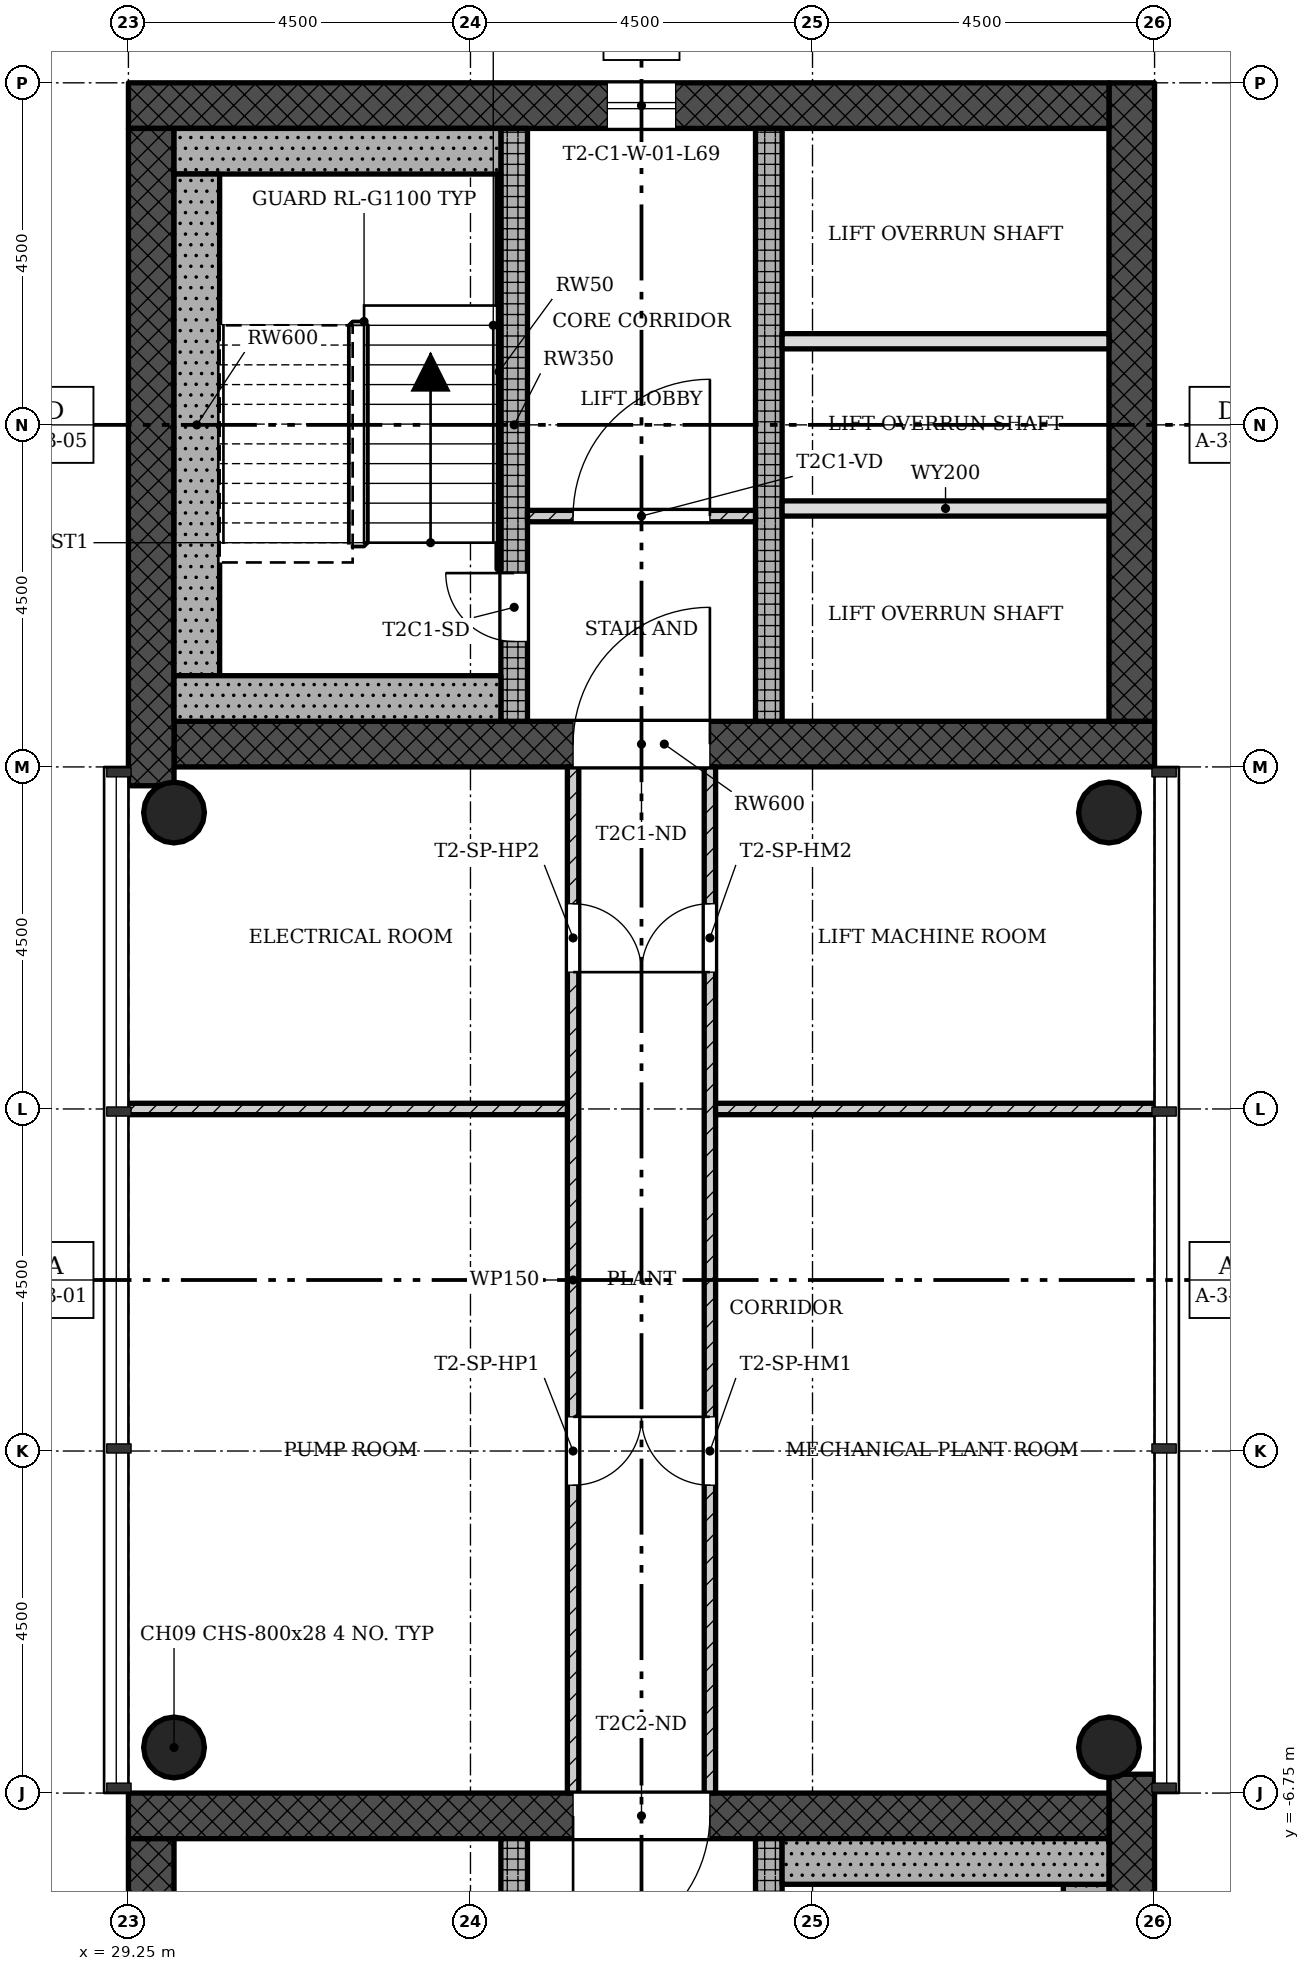
"""IFC4 building model, lengths in metres.
Left out: names, types, materials, properties, quantities, classifications, styles, units other than length and angle.
Written with IfcOpenShell. Run it as: python <this file> out.ifc"""

import sys

from ifc_helpers import new_model, si_unit, direction, frame, frame_2d, origin, origin_2d, place, context, subcontext, project, spatial, rectangle, hollow_circle, extrude, element, fill, save


model = new_model("IFC4")
c1 = context("Model", 3, precision=1e-05, world=origin(), true_north=direction((0.0, 1.0)))
c2 = subcontext(c1, "Body", "Model", "MODEL_VIEW")
j1 = project(units=[si_unit("LENGTHUNIT", "METRE"), si_unit("PLANEANGLEUNIT", "RADIAN")], contexts=[c1])
p1 = place(None, origin())
s1 = spatial("IfcSite", under=j1, at=p1, CompositionType="ELEMENT")
p2 = place(p1, origin())
s2 = spatial("IfcBuilding", under=s1, at=p2, CompositionType="ELEMENT")
p3 = place(p2, frame((0.0, 0.0, 251.4)))
s3 = spatial("IfcBuildingStorey", under=s2, at=p3, CompositionType="ELEMENT", Elevation=251.4)
p4 = place(p3, frame((29.85, 7.05, 0.0), z_axis=(0.0, 0.0, 1.0), x_axis=(1.0, 0.0, 0.0)))
e1 = element("IfcWall", 1, at=p4, inside=s3, PredefinedType="SHEAR", context=c2, shape_type="SweptSolid", body=[
    extrude(rectangle(XDim=12.9, YDim=0.6, at=frame_2d((6.45, 0.0))), origin(), (0.0, 0.0, 1.0), 4.5),
])
p5 = place(p4, frame((5.25, 0.0, 0.0)))
e2 = element("IfcOpeningElement", 2, at=p5, cuts=e1, PredefinedType="OPENING", context=c2, shape_type="SweptSolid", body=[
    extrude(rectangle(XDim=1.8, YDim=2.1, at=frame_2d((0.9, 1.05))), frame((0.0, 0.31, 0.0), z_axis=(0.0, -1.0, 0.0), x_axis=(1.0, 0.0, 0.0)), (0.0, 0.0, 1.0), 0.62),
])
p6 = place(p3, frame((42.45, 7.35, 0.0), z_axis=(0.0, 0.0, 1.0), x_axis=(0.0, 1.0, 0.0)))
e3 = element("IfcWall", 3, at=p6, inside=s3, PredefinedType="SHEAR", context=c2, shape_type="SweptSolid", body=[
    extrude(rectangle(XDim=8.4, YDim=0.6, at=frame_2d((4.2, 0.0))), origin(), (0.0, 0.0, 1.0), 4.5),
])
p7 = place(p3, frame((42.15, 15.45, 0.0), z_axis=(0.0, 0.0, 1.0), x_axis=(-1.0, 0.0, 0.0)))
e4 = element("IfcWall", 4, at=p7, inside=s3, PredefinedType="SHEAR", context=c2, shape_type="SweptSolid", body=[
    extrude(rectangle(XDim=12.9, YDim=0.6, at=frame_2d((6.45, 0.0))), origin(), (0.0, 0.0, 1.0), 4.5),
])
p8 = place(p7, frame((5.7, 0.0, 0.45)))
e5 = element("IfcOpeningElement", 5, at=p8, cuts=e4, PredefinedType="OPENING", context=c2, shape_type="SweptSolid", body=[
    extrude(rectangle(XDim=0.9, YDim=2.4, at=frame_2d((0.45, 1.2))), frame((0.0, 0.31, 0.0), z_axis=(0.0, -1.0, 0.0), x_axis=(1.0, 0.0, 0.0)), (0.0, 0.0, 1.0), 0.62),
])
p9 = place(p3, frame((29.55, 15.15, 0.0), z_axis=(0.0, 0.0, 1.0), x_axis=(0.0, -1.0, 0.0)))
e6 = element("IfcWall", 6, at=p9, inside=s3, PredefinedType="SHEAR", context=c2, shape_type="SweptSolid", body=[
    extrude(rectangle(XDim=8.648, YDim=0.6, at=frame_2d((4.324, 0.0))), origin(), (0.0, 0.0, 1.0), 4.5),
])
p10 = place(p3, frame((34.325, 7.35, 0.0), z_axis=(0.0, 0.0, 1.0), x_axis=(0.0, 1.0, 0.0)))
e7 = element("IfcWall", 7, at=p10, inside=s3, PredefinedType="SHEAR", context=c2, shape_type="SweptSolid", body=[
    extrude(rectangle(XDim=7.8, YDim=0.35, at=frame_2d((3.9, 0.0))), origin(), (0.0, 0.0, 1.0), 4.5),
])
p11 = place(p10, frame((1.05, 0.0, 0.0)))
e8 = element("IfcOpeningElement", 8, at=p11, cuts=e7, PredefinedType="OPENING", context=c2, shape_type="SweptSolid", body=[
    extrude(rectangle(XDim=0.9, YDim=2.1, at=frame_2d((0.45, 1.05))), frame((0.0, 0.185, 0.0), z_axis=(0.0, -1.0, 0.0), x_axis=(1.0, 0.0, 0.0)), (0.0, 0.0, 1.0), 0.37),
])
p12 = place(p3, frame((37.675, 7.35, 0.0), z_axis=(0.0, 0.0, 1.0), x_axis=(0.0, 1.0, 0.0)))
e9 = element("IfcWall", 9, at=p12, inside=s3, PredefinedType="SHEAR", context=c2, shape_type="SweptSolid", body=[
    extrude(rectangle(XDim=7.8, YDim=0.35, at=frame_2d((3.9, 0.0))), origin(), (0.0, 0.0, 1.0), 4.5),
])
p13 = place(p3, frame((42.45, -15.15, 0.0), z_axis=(0.0, 0.0, 1.0), x_axis=(0.0, 1.0, 0.0)))
e10 = element("IfcWall", 10, at=p13, inside=s3, PredefinedType="SHEAR", context=c2, shape_type="SweptSolid", body=[
    extrude(rectangle(XDim=8.648, YDim=0.6, at=frame_2d((4.324, 0.0))), origin(), (0.0, 0.0, 1.0), 4.5),
])
p14 = place(p3, frame((42.15, -7.05, 0.0), z_axis=(0.0, 0.0, 1.0), x_axis=(-1.0, 0.0, 0.0)))
e11 = element("IfcWall", 11, at=p14, inside=s3, PredefinedType="SHEAR", context=c2, shape_type="SweptSolid", body=[
    extrude(rectangle(XDim=12.9, YDim=0.6, at=frame_2d((6.45, 0.0))), origin(), (0.0, 0.0, 1.0), 4.5),
])
p15 = place(p14, frame((5.25, 0.0, 0.0)))
e12 = element("IfcOpeningElement", 12, at=p15, cuts=e11, PredefinedType="OPENING", context=c2, shape_type="SweptSolid", body=[
    extrude(rectangle(XDim=1.8, YDim=2.1, at=frame_2d((0.9, 1.05))), frame((0.0, 0.31, 0.0), z_axis=(0.0, -1.0, 0.0), x_axis=(1.0, 0.0, 0.0)), (0.0, 0.0, 1.0), 0.62),
])
p16 = place(p3, frame((29.55, -7.35, 0.0), z_axis=(0.0, 0.0, 1.0), x_axis=(0.0, -1.0, 0.0)))
e13 = element("IfcWall", 13, at=p16, inside=s3, PredefinedType="SHEAR", context=c2, shape_type="SweptSolid", body=[
    extrude(rectangle(XDim=8.4, YDim=0.6, at=frame_2d((4.2, 0.0))), origin(), (0.0, 0.0, 1.0), 4.5),
])
p17 = place(p3, frame((34.325, -15.15, 0.0), z_axis=(0.0, 0.0, 1.0), x_axis=(0.0, 1.0, 0.0)))
e14 = element("IfcWall", 14, at=p17, inside=s3, PredefinedType="SHEAR", context=c2, shape_type="SweptSolid", body=[
    extrude(rectangle(XDim=7.8, YDim=0.35, at=frame_2d((3.9, 0.0))), origin(), (0.0, 0.0, 1.0), 4.5),
])
p18 = place(p17, frame((5.55, 0.0, 0.0)))
e15 = element("IfcOpeningElement", 15, at=p18, cuts=e14, PredefinedType="OPENING", context=c2, shape_type="SweptSolid", body=[
    extrude(rectangle(XDim=1.1, YDim=2.1, at=frame_2d((0.55, 1.05))), frame((0.0, 0.185, 0.0), z_axis=(0.0, -1.0, 0.0), x_axis=(1.0, 0.0, 0.0)), (0.0, 0.0, 1.0), 0.37),
])
p19 = place(p17, frame((3.5, 0.0, 0.0)))
e16 = element("IfcOpeningElement", 16, at=p19, cuts=e14, PredefinedType="OPENING", context=c2, shape_type="SweptSolid", body=[
    extrude(rectangle(XDim=0.9, YDim=2.1, at=frame_2d((0.45, 1.05))), frame((0.0, 0.185, 0.0), z_axis=(0.0, -1.0, 0.0), x_axis=(1.0, 0.0, 0.0)), (0.0, 0.0, 1.0), 0.37),
])
p20 = place(p3, frame((37.675, -15.15, 0.0), z_axis=(0.0, 0.0, 1.0), x_axis=(0.0, 1.0, 0.0)))
e17 = element("IfcWall", 17, at=p20, inside=s3, PredefinedType="SHEAR", context=c2, shape_type="SweptSolid", body=[
    extrude(rectangle(XDim=7.8, YDim=0.35, at=frame_2d((3.9, 0.0))), origin(), (0.0, 0.0, 1.0), 4.5),
])
p21 = place(p20, frame((5.85, 0.0, 0.0)))
e18 = element("IfcOpeningElement", 18, at=p21, cuts=e17, PredefinedType="OPENING", context=c2, shape_type="SweptSolid", body=[
    extrude(rectangle(XDim=0.9, YDim=2.1, at=frame_2d((0.45, 1.05))), frame((0.0, 0.185, 0.0), z_axis=(0.0, -1.0, 0.0), x_axis=(1.0, 0.0, 0.0)), (0.0, 0.0, 1.0), 0.37),
])
for number, where, z_axis, x_axis in (
    (19, (42.15, -6.15, 0.0), (0.0, 0.0, 1.0), (1.0, 0.0, 0.0)),
    (20, (42.15, 6.15, 0.0), (0.0, 0.0, 1.0), (1.0, 0.0, 0.0)),
    (21, (29.85, 6.15, 0.0), (0.0, 0.0, 1.0), (1.0, 0.0, 0.0)),
    (22, (29.85, -6.15, 0.0), (0.0, 0.0, 1.0), (1.0, 0.0, 0.0)),
):
    element("IfcColumn", number, at=place(p3, frame(where, z_axis=z_axis, x_axis=x_axis)), inside=s3, PredefinedType="COLUMN", context=c2, shape_type="SweptSolid", body=[
        extrude(hollow_circle(Radius=0.4, WallThickness=0.028, at=origin_2d()), origin(), (0.0, 0.0, 1.0), 4.5),
    ])
p22 = place(p3, frame((37.5, 10.05, 0.0), z_axis=(0.0, 0.0, 1.0), x_axis=(-1.0, 0.0, 0.0)))
e23 = element("IfcWall", 23, at=p22, inside=s3, PredefinedType="PARTITIONING", context=c2, shape_type="SweptSolid", body=[
    extrude(rectangle(XDim=3.0, YDim=0.15, at=frame_2d((1.5, 0.0))), origin(), (0.0, 0.0, 1.0), 4.1),
])
p23 = place(p22, frame((0.6, 0.0, 0.0)))
e24 = element("IfcOpeningElement", 24, at=p23, cuts=e23, PredefinedType="OPENING", context=c2, shape_type="SweptSolid", body=[
    extrude(rectangle(XDim=1.8, YDim=2.1, at=frame_2d((0.9, 1.05))), frame((0.0, 0.085, 0.0), z_axis=(0.0, -1.0, 0.0), x_axis=(1.0, 0.0, 0.0)), (0.0, 0.0, 1.0), 0.17),
])
for number, where, z_axis, x_axis in (
    (25, (42.15, 10.15, 0.0), (0.0, 0.0, 1.0), (-1.0, 0.0, 0.0)),
    (26, (42.15, 12.35, 0.0), (0.0, 0.0, 1.0), (-1.0, 0.0, 0.0)),
):
    element("IfcWall", number, at=place(p3, frame(where, z_axis=z_axis, x_axis=x_axis)), inside=s3, PredefinedType="SOLIDWALL", context=c2, shape_type="SweptSolid", body=[
        extrude(rectangle(XDim=4.3, YDim=0.2, at=frame_2d((2.15, 0.0))), origin(), (0.0, 0.0, 1.0), 4.1),
    ])
p24 = place(p3, frame((35.1, -6.75, 0.0), z_axis=(0.0, 0.0, 1.0), x_axis=(0.0, 1.0, 0.0)))
e27 = element("IfcWall", 27, at=p24, inside=s3, PredefinedType="PARTITIONING", context=c2, shape_type="SweptSolid", body=[
    extrude(rectangle(XDim=13.5, YDim=0.15, at=frame_2d((6.75, 0.0))), origin(), (0.0, 0.0, 1.0), 4.1),
])
p25 = place(p24, frame((4.05, 0.0, 0.0)))
e28 = element("IfcOpeningElement", 28, at=p25, cuts=e27, PredefinedType="OPENING", context=c2, shape_type="SweptSolid", body=[
    extrude(rectangle(XDim=0.9, YDim=2.1, at=frame_2d((0.45, 1.05))), frame((0.0, 0.085, 0.0), z_axis=(0.0, -1.0, 0.0), x_axis=(1.0, 0.0, 0.0)), (0.0, 0.0, 1.0), 0.17),
])
p26 = place(p24, frame((10.8, 0.0, 0.0)))
e29 = element("IfcOpeningElement", 29, at=p26, cuts=e27, PredefinedType="OPENING", context=c2, shape_type="SweptSolid", body=[
    extrude(rectangle(XDim=0.9, YDim=2.1, at=frame_2d((0.45, 1.05))), frame((0.0, 0.085, 0.0), z_axis=(0.0, -1.0, 0.0), x_axis=(1.0, 0.0, 0.0)), (0.0, 0.0, 1.0), 0.17),
])
p27 = place(p3, frame((35.025, 2.25, 0.0), z_axis=(0.0, 0.0, 1.0), x_axis=(-1.0, 0.0, 0.0)))
e30 = element("IfcWall", 30, at=p27, inside=s3, PredefinedType="PARTITIONING", context=c2, shape_type="SweptSolid", body=[
    extrude(rectangle(XDim=5.875, YDim=0.15, at=frame_2d((2.938, 0.0))), origin(), (0.0, 0.0, 1.0), 4.1),
])
p28 = place(p3, frame((36.9, -6.75, 0.0), z_axis=(0.0, 0.0, 1.0), x_axis=(0.0, 1.0, 0.0)))
e31 = element("IfcWall", 31, at=p28, inside=s3, PredefinedType="PARTITIONING", context=c2, shape_type="SweptSolid", body=[
    extrude(rectangle(XDim=13.5, YDim=0.15, at=frame_2d((6.75, 0.0))), origin(), (0.0, 0.0, 1.0), 4.1),
])
p29 = place(p28, frame((4.05, 0.0, 0.0)))
e32 = element("IfcOpeningElement", 32, at=p29, cuts=e31, PredefinedType="OPENING", context=c2, shape_type="SweptSolid", body=[
    extrude(rectangle(XDim=0.9, YDim=2.1, at=frame_2d((0.45, 1.05))), frame((0.0, 0.085, 0.0), z_axis=(0.0, -1.0, 0.0), x_axis=(1.0, 0.0, 0.0)), (0.0, 0.0, 1.0), 0.17),
])
p30 = place(p28, frame((10.8, 0.0, 0.0)))
e33 = element("IfcOpeningElement", 33, at=p30, cuts=e31, PredefinedType="OPENING", context=c2, shape_type="SweptSolid", body=[
    extrude(rectangle(XDim=0.9, YDim=2.1, at=frame_2d((0.45, 1.05))), frame((0.0, 0.085, 0.0), z_axis=(0.0, -1.0, 0.0), x_axis=(1.0, 0.0, 0.0)), (0.0, 0.0, 1.0), 0.17),
])
p31 = place(p3, frame((36.975, 2.25, 0.0), z_axis=(0.0, 0.0, 1.0), x_axis=(1.0, 0.0, 0.0)))
e34 = element("IfcWall", 34, at=p31, inside=s3, PredefinedType="PARTITIONING", context=c2, shape_type="SweptSolid", body=[
    extrude(rectangle(XDim=5.875, YDim=0.15, at=frame_2d((2.938, 0.0))), origin(), (0.0, 0.0, 1.0), 4.1),
])
p32 = place(p3, frame((34.15, 14.85, 0.0), z_axis=(0.0, 0.0, 1.0), x_axis=(-1.0, 0.0, 0.0)))
e35 = element("IfcWall", 35, at=p32, inside=s3, PredefinedType="SHEAR", context=c2, shape_type="SweptSolid", body=[
    extrude(rectangle(XDim=4.3, YDim=0.6, at=frame_2d((2.15, 0.0))), origin(), (0.0, 0.0, 1.0), 4.5),
])
p33 = place(p3, frame((30.15, 7.95, 0.0), z_axis=(0.0, 0.0, 1.0), x_axis=(0.0, 1.0, 0.0)))
e36 = element("IfcWall", 36, at=p33, inside=s3, PredefinedType="SHEAR", context=c2, shape_type="SweptSolid", body=[
    extrude(rectangle(XDim=6.6, YDim=0.6, at=frame_2d((3.3, 0.0))), origin(), (0.0, 0.0, 1.0), 4.5),
])
p34 = place(p3, frame((34.15, 7.65, 0.0), z_axis=(0.0, 0.0, 1.0), x_axis=(-1.0, 0.0, 0.0)))
e37 = element("IfcWall", 37, at=p34, inside=s3, PredefinedType="SHEAR", context=c2, shape_type="SweptSolid", body=[
    extrude(rectangle(XDim=4.3, YDim=0.6, at=frame_2d((2.15, 0.0))), origin(), (0.0, 0.0, 1.0), 4.5),
])
p35 = place(p3, frame((34.125, 9.35, 0.0), z_axis=(0.0, 0.0, 1.0), x_axis=(0.0, 1.0, 0.0)))
e38 = element("IfcWall", 38, at=p35, inside=s3, PredefinedType="SHEAR", context=c2, shape_type="SweptSolid", body=[
    extrude(rectangle(XDim=5.2, YDim=0.05, at=frame_2d((2.6, 0.0))), origin(), (0.0, 0.0, 1.0), 4.5),
])
p36 = place(p3, frame((41.85, -7.95, 0.0), z_axis=(0.0, 0.0, 1.0), x_axis=(0.0, -1.0, 0.0)))
e39 = element("IfcWall", 39, at=p36, inside=s3, PredefinedType="SHEAR", context=c2, shape_type="SweptSolid", body=[
    extrude(rectangle(XDim=6.6, YDim=0.6, at=frame_2d((3.3, 0.0))), origin(), (0.0, 0.0, 1.0), 4.5),
])
p37 = place(p3, frame((37.85, -7.65, 0.0), z_axis=(0.0, 0.0, 1.0), x_axis=(1.0, 0.0, 0.0)))
e40 = element("IfcWall", 40, at=p37, inside=s3, PredefinedType="SHEAR", context=c2, shape_type="SweptSolid", body=[
    extrude(rectangle(XDim=4.3, YDim=0.6, at=frame_2d((2.15, 0.0))), origin(), (0.0, 0.0, 1.0), 4.5),
])
p38 = place(p8, origin())
e41 = element("IfcWindow", 41, at=p38, inside=s3, PartitioningType="SINGLE_PANEL", PredefinedType="WINDOW", context=c2, shape_type="SweptSolid", body=[
    extrude(rectangle(XDim=0.9, YDim=2.4, at=frame_2d((0.45, 1.2))), frame((0.0, 0.03, 0.0), z_axis=(0.0, -1.0, 0.0), x_axis=(1.0, 0.0, 0.0)), (0.0, 0.0, 1.0), 0.06),
])
fill(e5, e41)
p39 = place(p23, origin())
e42 = element("IfcDoor", 42, at=p39, inside=s3, OperationType="SINGLE_SWING_LEFT", PredefinedType="DOOR", context=c2, shape_type="SweptSolid", body=[
    extrude(rectangle(XDim=1.8, YDim=2.1, at=frame_2d((0.9, 1.05))), frame((0.0, 0.025, 0.0), z_axis=(0.0, -1.0, 0.0), x_axis=(1.0, 0.0, 0.0)), (0.0, 0.0, 1.0), 0.05),
])
fill(e24, e42)
p40 = place(p25, origin())
e43 = element("IfcDoor", 43, at=p40, inside=s3, OperationType="SINGLE_SWING_RIGHT", PredefinedType="DOOR", context=c2, shape_type="SweptSolid", body=[
    extrude(rectangle(XDim=0.9, YDim=2.1, at=frame_2d((0.45, 1.05))), frame((0.0, 0.025, 0.0), z_axis=(0.0, -1.0, 0.0), x_axis=(1.0, 0.0, 0.0)), (0.0, 0.0, 1.0), 0.05),
])
fill(e28, e43)
p41 = place(p26, origin())
e44 = element("IfcDoor", 44, at=p41, inside=s3, OperationType="SINGLE_SWING_LEFT", PredefinedType="DOOR", context=c2, shape_type="SweptSolid", body=[
    extrude(rectangle(XDim=0.9, YDim=2.1, at=frame_2d((0.45, 1.05))), frame((0.0, 0.025, 0.0), z_axis=(0.0, -1.0, 0.0), x_axis=(1.0, 0.0, 0.0)), (0.0, 0.0, 1.0), 0.05),
])
fill(e29, e44)
p42 = place(p29, origin())
e45 = element("IfcDoor", 45, at=p42, inside=s3, OperationType="SINGLE_SWING_LEFT", PredefinedType="DOOR", context=c2, shape_type="SweptSolid", body=[
    extrude(rectangle(XDim=0.9, YDim=2.1, at=frame_2d((0.45, 1.05))), frame((0.0, 0.025, 0.0), z_axis=(0.0, -1.0, 0.0), x_axis=(1.0, 0.0, 0.0)), (0.0, 0.0, 1.0), 0.05),
])
fill(e32, e45)
p43 = place(p30, origin())
e46 = element("IfcDoor", 46, at=p43, inside=s3, OperationType="SINGLE_SWING_RIGHT", PredefinedType="DOOR", context=c2, shape_type="SweptSolid", body=[
    extrude(rectangle(XDim=0.9, YDim=2.1, at=frame_2d((0.45, 1.05))), frame((0.0, 0.025, 0.0), z_axis=(0.0, -1.0, 0.0), x_axis=(1.0, 0.0, 0.0)), (0.0, 0.0, 1.0), 0.05),
])
fill(e33, e46)
p44 = place(p11, origin())
e47 = element("IfcDoor", 47, at=p44, inside=s3, OperationType="SINGLE_SWING_LEFT", PredefinedType="DOOR", context=c2, shape_type="SweptSolid", body=[
    extrude(rectangle(XDim=0.9, YDim=2.1, at=frame_2d((0.45, 1.05))), frame((0.0, 0.025, 0.0), z_axis=(0.0, -1.0, 0.0), x_axis=(1.0, 0.0, 0.0)), (0.0, 0.0, 1.0), 0.05),
])
fill(e8, e47)
p45 = place(p5, origin())
e48 = element("IfcDoor", 48, at=p45, inside=s3, OperationType="SINGLE_SWING_LEFT", PredefinedType="DOOR", context=c2, shape_type="SweptSolid", body=[
    extrude(rectangle(XDim=1.8, YDim=2.1, at=frame_2d((0.9, 1.05))), frame((0.0, 0.025, 0.0), z_axis=(0.0, -1.0, 0.0), x_axis=(1.0, 0.0, 0.0)), (0.0, 0.0, 1.0), 0.05),
])
fill(e2, e48)
p46 = place(p15, origin())
e49 = element("IfcDoor", 49, at=p46, inside=s3, OperationType="SINGLE_SWING_LEFT", PredefinedType="DOOR", context=c2, shape_type="SweptSolid", body=[
    extrude(rectangle(XDim=1.8, YDim=2.1, at=frame_2d((0.9, 1.05))), frame((0.0, 0.025, 0.0), z_axis=(0.0, -1.0, 0.0), x_axis=(1.0, 0.0, 0.0)), (0.0, 0.0, 1.0), 0.05),
])
fill(e12, e49)
save(model, sys.argv[1])
